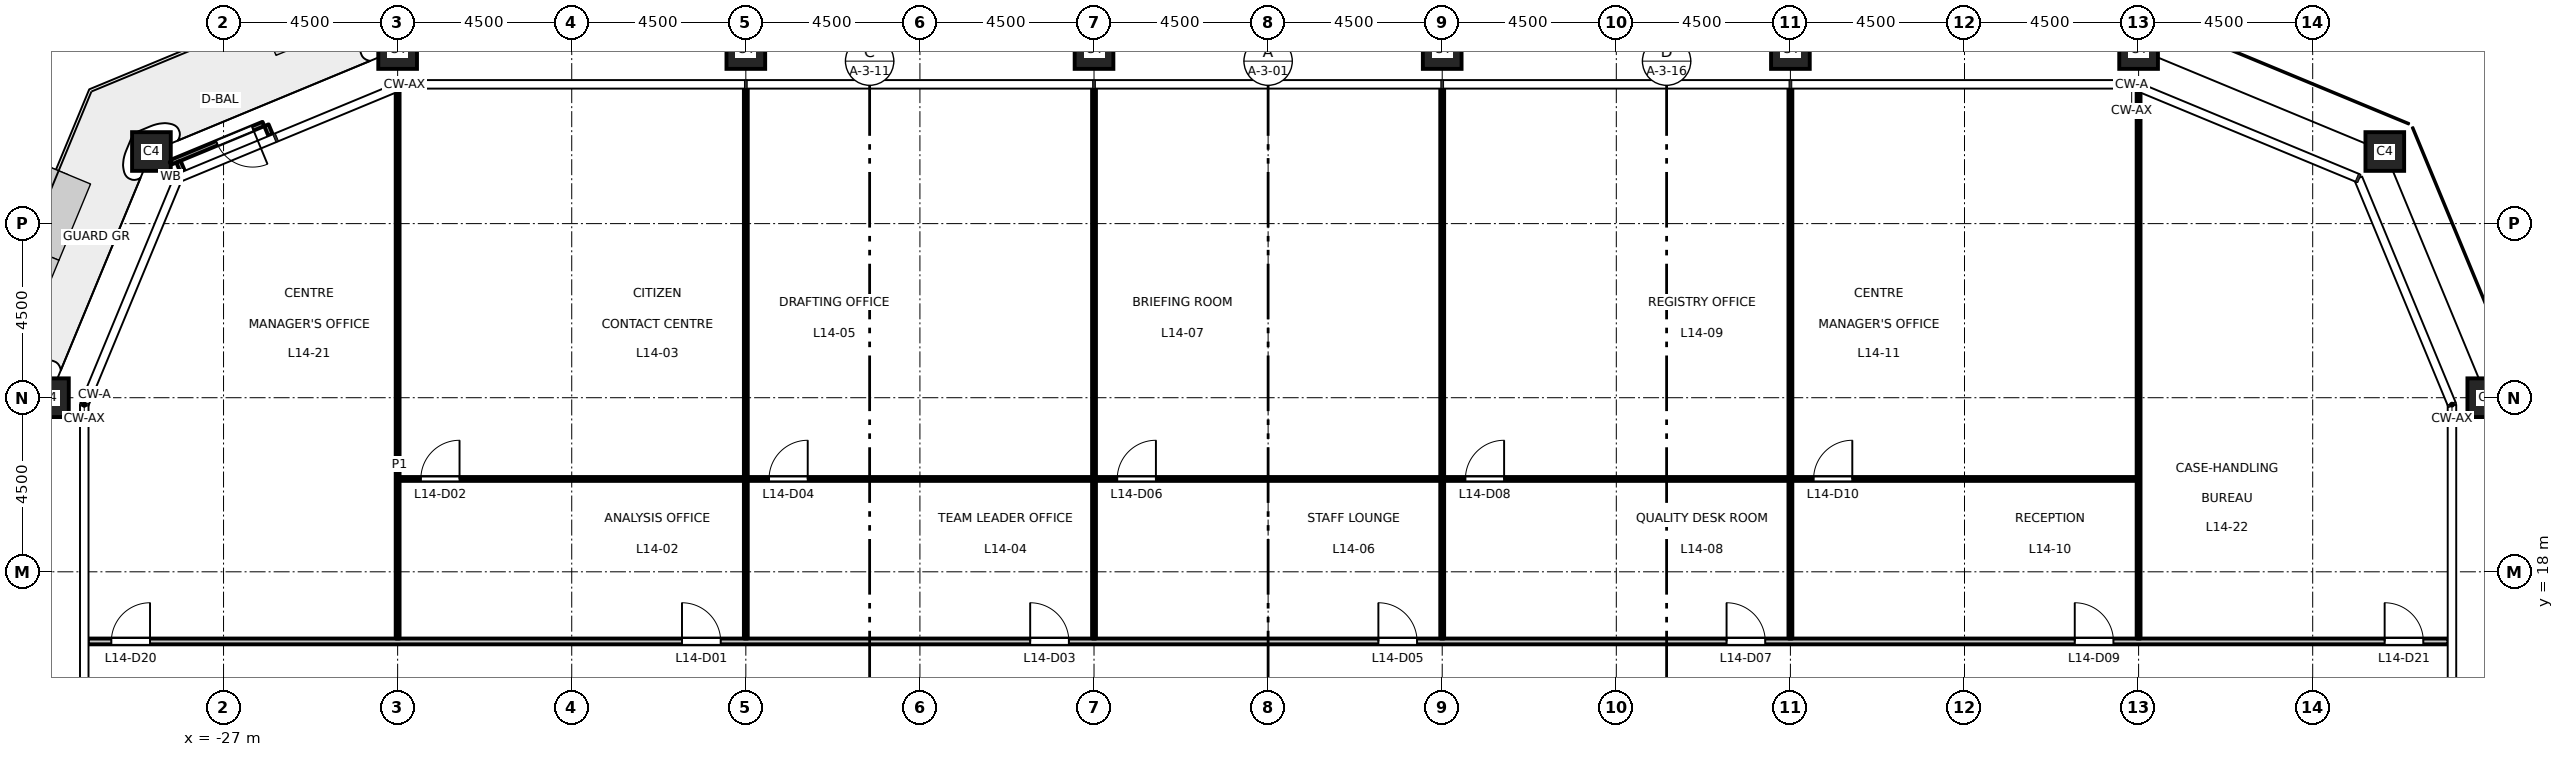
"""IFC4 building model, lengths in metres.
Left out: names, types, materials, properties, quantities, classifications, styles, units other than length and angle.
Written with IfcOpenShell. Run it as: python <this file> out.ifc"""

import sys

from ifc_helpers import new_model, si_unit, direction, frame, frame_2d, origin, origin_2d, place, context, subcontext, project, spatial, rectangle, hollow_rectangle, extrude, element, fill, save


model = new_model("IFC4")
c1 = context("Model", 3, precision=1e-05, world=origin(), true_north=direction((0.0, 1.0)))
c2 = subcontext(c1, "Body", "Model", "MODEL_VIEW")
j1 = project(units=[si_unit("LENGTHUNIT", "METRE"), si_unit("PLANEANGLEUNIT", "RADIAN")], contexts=[c1])
p1 = place(None, origin())
s1 = spatial("IfcSite", under=j1, at=p1, CompositionType="ELEMENT")
p2 = place(p1, origin())
s2 = spatial("IfcBuilding", under=s1, at=p2, CompositionType="ELEMENT")
p3 = place(p2, frame((0.0, 0.0, 67.2)))
s3 = spatial("IfcBuildingStorey", under=s2, at=p3, CompositionType="ELEMENT", Elevation=67.2)
for number, where, z_axis, x_axis in (
    (1, (31.5, 22.5, 0.0), (0.0, 0.0, 1.0), (1.0, 0.0, 0.0)),
    (2, (28.864, 28.864, 0.0), (0.0, 0.0, 1.0), (1.0, 0.0, 0.0)),
    (3, (22.5, 31.5, 0.0), (0.0, 0.0, 1.0), (1.0, 0.0, 0.0)),
    (4, (13.5, 31.5, 0.0), (0.0, 0.0, 1.0), (1.0, 0.0, 0.0)),
    (5, (4.5, 31.5, 0.0), (0.0, 0.0, 1.0), (1.0, 0.0, 0.0)),
    (6, (-4.5, 31.5, 0.0), (0.0, 0.0, 1.0), (1.0, 0.0, 0.0)),
    (7, (-13.5, 31.5, 0.0), (0.0, 0.0, 1.0), (1.0, 0.0, 0.0)),
    (8, (-22.5, 31.5, 0.0), (0.0, 0.0, 1.0), (1.0, 0.0, 0.0)),
    (9, (-28.864, 28.864, 0.0), (0.0, 0.0, 1.0), (1.0, 0.0, 0.0)),
    (10, (-31.5, 22.5, 0.0), (0.0, 0.0, 1.0), (1.0, 0.0, 0.0)),
):
    element("IfcColumn", number, at=place(p3, frame(where, z_axis=z_axis, x_axis=x_axis)), inside=s3, PredefinedType="COLUMN", context=c2, shape_type="SweptSolid", body=[
        extrude(hollow_rectangle(XDim=1.0, YDim=1.0, WallThickness=0.06, at=origin_2d()), origin(), (0.0, 0.0, 1.0), 4.5),
    ])
p4 = place(p3, frame((-25.783, 29.285, 0.0), z_axis=(0.0, 0.0, 1.0), x_axis=(-0.382942403136, 0.923772220778, 0.0)))
e11 = element("IfcWall", 11, at=p4, inside=s3, PredefinedType="STANDARD", context=c2, shape_type="SweptSolid", body=[
    extrude(rectangle(XDim=0.28, YDim=0.12, at=frame_2d((0.14, 0.0))), origin(), (0.0, 0.0, 1.0), 4.35),
])
p5 = place(p3, frame((-28.058, 28.343, 0.0), z_axis=(0.0, 0.0, 1.0), x_axis=(-0.382634050621, 0.923899985553, 0.0)))
e12 = element("IfcWall", 12, at=p5, inside=s3, PredefinedType="STANDARD", context=c2, shape_type="SweptSolid", body=[
    extrude(rectangle(XDim=0.28, YDim=0.12, at=frame_2d((0.14, 0.0))), origin(), (0.0, 0.0, 1.0), 4.35),
])
p6 = place(p3, frame((-25.969, 29.576, 0.0), z_axis=(0.0, 0.0, 1.0), x_axis=(-0.923894017707, -0.382648460137, 0.0)))
e13 = element("IfcWall", 13, at=p6, inside=s3, PredefinedType="STANDARD", context=c2, shape_type="SweptSolid", body=[
    extrude(rectangle(XDim=2.592, YDim=0.12, at=frame_2d((1.296, 0.0))), origin(), (0.0, 0.0, 1.0), 4.35),
])
p7 = place(p6, frame((0.3, 0.0, 0.0)))
e14 = element("IfcOpeningElement", 14, at=p7, cuts=e13, PredefinedType="OPENING", context=c2, shape_type="SweptSolid", body=[
    extrude(rectangle(XDim=1.0, YDim=2.4, at=frame_2d((0.5, 1.2))), frame((0.0, 0.07, 0.0), z_axis=(0.0, -1.0, 0.0), x_axis=(1.0, 0.0, 0.0)), (0.0, 0.0, 1.0), 0.14),
])
p8 = place(p3, frame((-30.51, 16.2, 0.0), z_axis=(0.0, 0.0, 1.0), x_axis=(1.0, 0.0, 0.0)))
e15 = element("IfcWall", 15, at=p8, inside=s3, PredefinedType="PARTITIONING", context=c2, shape_type="SweptSolid", body=[
    extrude(rectangle(XDim=61.02, YDim=0.15, at=frame_2d((30.51, 0.0))), origin(), (0.0, 0.0, 1.0), 4.35),
])
p9 = place(p8, frame((15.36, 0.0, 0.0)))
e16 = element("IfcOpeningElement", 16, at=p9, cuts=e15, PredefinedType="OPENING", context=c2, shape_type="SweptSolid", body=[
    extrude(rectangle(XDim=1.0, YDim=2.1, at=frame_2d((0.5, 1.05))), frame((0.0, 0.085, 0.0), z_axis=(0.0, -1.0, 0.0), x_axis=(1.0, 0.0, 0.0)), (0.0, 0.0, 1.0), 0.17),
])
p10 = place(p8, frame((24.36, 0.0, 0.0)))
e17 = element("IfcOpeningElement", 17, at=p10, cuts=e15, PredefinedType="OPENING", context=c2, shape_type="SweptSolid", body=[
    extrude(rectangle(XDim=1.0, YDim=2.1, at=frame_2d((0.5, 1.05))), frame((0.0, 0.085, 0.0), z_axis=(0.0, -1.0, 0.0), x_axis=(1.0, 0.0, 0.0)), (0.0, 0.0, 1.0), 0.17),
])
p11 = place(p8, frame((33.36, 0.0, 0.0)))
e18 = element("IfcOpeningElement", 18, at=p11, cuts=e15, PredefinedType="OPENING", context=c2, shape_type="SweptSolid", body=[
    extrude(rectangle(XDim=1.0, YDim=2.1, at=frame_2d((0.5, 1.05))), frame((0.0, 0.085, 0.0), z_axis=(0.0, -1.0, 0.0), x_axis=(1.0, 0.0, 0.0)), (0.0, 0.0, 1.0), 0.17),
])
p12 = place(p8, frame((42.36, 0.0, 0.0)))
e19 = element("IfcOpeningElement", 19, at=p12, cuts=e15, PredefinedType="OPENING", context=c2, shape_type="SweptSolid", body=[
    extrude(rectangle(XDim=1.0, YDim=2.1, at=frame_2d((0.5, 1.05))), frame((0.0, 0.085, 0.0), z_axis=(0.0, -1.0, 0.0), x_axis=(1.0, 0.0, 0.0)), (0.0, 0.0, 1.0), 0.17),
])
p13 = place(p8, frame((51.36, 0.0, 0.0)))
e20 = element("IfcOpeningElement", 20, at=p13, cuts=e15, PredefinedType="OPENING", context=c2, shape_type="SweptSolid", body=[
    extrude(rectangle(XDim=1.0, YDim=2.1, at=frame_2d((0.5, 1.05))), frame((0.0, 0.085, 0.0), z_axis=(0.0, -1.0, 0.0), x_axis=(1.0, 0.0, 0.0)), (0.0, 0.0, 1.0), 0.17),
])
p14 = place(p8, frame((0.61, 0.0, 0.0)))
e21 = element("IfcOpeningElement", 21, at=p14, cuts=e15, PredefinedType="OPENING", context=c2, shape_type="SweptSolid", body=[
    extrude(rectangle(XDim=1.0, YDim=2.1, at=frame_2d((0.5, 1.05))), frame((0.0, 0.085, 0.0), z_axis=(0.0, -1.0, 0.0), x_axis=(1.0, 0.0, 0.0)), (0.0, 0.0, 1.0), 0.17),
])
p15 = place(p8, frame((59.37, 0.0, 0.0)))
e22 = element("IfcOpeningElement", 22, at=p15, cuts=e15, PredefinedType="OPENING", context=c2, shape_type="SweptSolid", body=[
    extrude(rectangle(XDim=1.0, YDim=2.1, at=frame_2d((0.5, 1.05))), frame((0.0, 0.085, 0.0), z_axis=(0.0, -1.0, 0.0), x_axis=(1.0, 0.0, 0.0)), (0.0, 0.0, 1.0), 0.17),
])
p16 = place(p3, frame((-22.45, 20.4, 0.0), z_axis=(0.0, 0.0, 1.0), x_axis=(1.0, 0.0, 0.0)))
e23 = element("IfcWall", 23, at=p16, inside=s3, PredefinedType="PARTITIONING", context=c2, shape_type="SweptSolid", body=[
    extrude(rectangle(XDim=44.9, YDim=0.1, at=frame_2d((22.45, 0.0))), origin(), (0.0, 0.0, 1.0), 4.35),
])
p17 = place(p16, frame((0.55, 0.0, 0.0)))
e24 = element("IfcOpeningElement", 24, at=p17, cuts=e23, PredefinedType="OPENING", context=c2, shape_type="SweptSolid", body=[
    extrude(rectangle(XDim=1.0, YDim=2.1, at=frame_2d((0.5, 1.05))), frame((0.0, 0.06, 0.0), z_axis=(0.0, -1.0, 0.0), x_axis=(1.0, 0.0, 0.0)), (0.0, 0.0, 1.0), 0.12),
])
p18 = place(p16, frame((9.55, 0.0, 0.0)))
e25 = element("IfcOpeningElement", 25, at=p18, cuts=e23, PredefinedType="OPENING", context=c2, shape_type="SweptSolid", body=[
    extrude(rectangle(XDim=1.0, YDim=2.1, at=frame_2d((0.5, 1.05))), frame((0.0, 0.06, 0.0), z_axis=(0.0, -1.0, 0.0), x_axis=(1.0, 0.0, 0.0)), (0.0, 0.0, 1.0), 0.12),
])
p19 = place(p16, frame((18.55, 0.0, 0.0)))
e26 = element("IfcOpeningElement", 26, at=p19, cuts=e23, PredefinedType="OPENING", context=c2, shape_type="SweptSolid", body=[
    extrude(rectangle(XDim=1.0, YDim=2.1, at=frame_2d((0.5, 1.05))), frame((0.0, 0.06, 0.0), z_axis=(0.0, -1.0, 0.0), x_axis=(1.0, 0.0, 0.0)), (0.0, 0.0, 1.0), 0.12),
])
p20 = place(p16, frame((27.55, 0.0, 0.0)))
e27 = element("IfcOpeningElement", 27, at=p20, cuts=e23, PredefinedType="OPENING", context=c2, shape_type="SweptSolid", body=[
    extrude(rectangle(XDim=1.0, YDim=2.1, at=frame_2d((0.5, 1.05))), frame((0.0, 0.06, 0.0), z_axis=(0.0, -1.0, 0.0), x_axis=(1.0, 0.0, 0.0)), (0.0, 0.0, 1.0), 0.12),
])
p21 = place(p16, frame((36.55, 0.0, 0.0)))
e28 = element("IfcOpeningElement", 28, at=p21, cuts=e23, PredefinedType="OPENING", context=c2, shape_type="SweptSolid", body=[
    extrude(rectangle(XDim=1.0, YDim=2.1, at=frame_2d((0.5, 1.05))), frame((0.0, 0.06, 0.0), z_axis=(0.0, -1.0, 0.0), x_axis=(1.0, 0.0, 0.0)), (0.0, 0.0, 1.0), 0.12),
])
p22 = place(p3, frame((-22.5, 16.275, 0.0), z_axis=(0.0, 0.0, 1.0), x_axis=(0.0, 1.0, 0.0)))
e29 = element("IfcWall", 29, at=p22, inside=s3, PredefinedType="PARTITIONING", context=c2, shape_type="SweptSolid", body=[
    extrude(rectangle(XDim=14.153, YDim=0.1, at=frame_2d((7.077, 0.0))), origin(), (0.0, 0.0, 1.0), 3.35),
])
p23 = place(p3, frame((-13.5, 16.275, 0.0), z_axis=(0.0, 0.0, 1.0), x_axis=(0.0, 1.0, 0.0)))
e30 = element("IfcWall", 30, at=p23, inside=s3, PredefinedType="PARTITIONING", context=c2, shape_type="SweptSolid", body=[
    extrude(rectangle(XDim=4.075, YDim=0.1, at=frame_2d((2.038, 0.0))), origin(), (0.0, 0.0, 1.0), 3.35),
])
p24 = place(p3, frame((-13.5, 20.45, 0.0), z_axis=(0.0, 0.0, 1.0), x_axis=(0.0, 1.0, 0.0)))
e31 = element("IfcWall", 31, at=p24, inside=s3, PredefinedType="PARTITIONING", context=c2, shape_type="SweptSolid", body=[
    extrude(rectangle(XDim=10.06, YDim=0.1, at=frame_2d((5.03, 0.0))), origin(), (0.0, 0.0, 1.0), 3.35),
])
p25 = place(p3, frame((-4.5, 16.275, 0.0), z_axis=(0.0, 0.0, 1.0), x_axis=(0.0, 1.0, 0.0)))
e32 = element("IfcWall", 32, at=p25, inside=s3, PredefinedType="PARTITIONING", context=c2, shape_type="SweptSolid", body=[
    extrude(rectangle(XDim=4.075, YDim=0.1, at=frame_2d((2.038, 0.0))), origin(), (0.0, 0.0, 1.0), 3.35),
])
p26 = place(p3, frame((-4.5, 20.45, 0.0), z_axis=(0.0, 0.0, 1.0), x_axis=(0.0, 1.0, 0.0)))
e33 = element("IfcWall", 33, at=p26, inside=s3, PredefinedType="PARTITIONING", context=c2, shape_type="SweptSolid", body=[
    extrude(rectangle(XDim=10.06, YDim=0.1, at=frame_2d((5.03, 0.0))), origin(), (0.0, 0.0, 1.0), 3.35),
])
p27 = place(p3, frame((4.5, 16.275, 0.0), z_axis=(0.0, 0.0, 1.0), x_axis=(0.0, 1.0, 0.0)))
e34 = element("IfcWall", 34, at=p27, inside=s3, PredefinedType="PARTITIONING", context=c2, shape_type="SweptSolid", body=[
    extrude(rectangle(XDim=4.075, YDim=0.1, at=frame_2d((2.038, 0.0))), origin(), (0.0, 0.0, 1.0), 3.35),
])
p28 = place(p3, frame((4.5, 20.45, 0.0), z_axis=(0.0, 0.0, 1.0), x_axis=(0.0, 1.0, 0.0)))
e35 = element("IfcWall", 35, at=p28, inside=s3, PredefinedType="PARTITIONING", context=c2, shape_type="SweptSolid", body=[
    extrude(rectangle(XDim=10.06, YDim=0.1, at=frame_2d((5.03, 0.0))), origin(), (0.0, 0.0, 1.0), 3.35),
])
p29 = place(p3, frame((13.5, 16.275, 0.0), z_axis=(0.0, 0.0, 1.0), x_axis=(0.0, 1.0, 0.0)))
e36 = element("IfcWall", 36, at=p29, inside=s3, PredefinedType="PARTITIONING", context=c2, shape_type="SweptSolid", body=[
    extrude(rectangle(XDim=4.075, YDim=0.1, at=frame_2d((2.038, 0.0))), origin(), (0.0, 0.0, 1.0), 3.35),
])
p30 = place(p3, frame((13.5, 20.45, 0.0), z_axis=(0.0, 0.0, 1.0), x_axis=(0.0, 1.0, 0.0)))
e37 = element("IfcWall", 37, at=p30, inside=s3, PredefinedType="PARTITIONING", context=c2, shape_type="SweptSolid", body=[
    extrude(rectangle(XDim=10.06, YDim=0.1, at=frame_2d((5.03, 0.0))), origin(), (0.0, 0.0, 1.0), 3.35),
])
p31 = place(p3, frame((22.5, 16.275, 0.0), z_axis=(0.0, 0.0, 1.0), x_axis=(0.0, 1.0, 0.0)))
e38 = element("IfcWall", 38, at=p31, inside=s3, PredefinedType="PARTITIONING", context=c2, shape_type="SweptSolid", body=[
    extrude(rectangle(XDim=14.153, YDim=0.1, at=frame_2d((7.077, 0.0))), origin(), (0.0, 0.0, 1.0), 3.35),
])
p32 = place(p7, origin())
e39 = element("IfcDoor", 39, at=p32, inside=s3, OperationType="SINGLE_SWING_LEFT", PredefinedType="DOOR", context=c2, shape_type="SweptSolid", body=[
    extrude(rectangle(XDim=1.0, YDim=2.4, at=frame_2d((0.5, 1.2))), frame((0.0, 0.025, 0.0), z_axis=(0.0, -1.0, 0.0), x_axis=(1.0, 0.0, 0.0)), (0.0, 0.0, 1.0), 0.05),
])
fill(e14, e39)
p33 = place(p9, origin())
e40 = element("IfcDoor", 40, at=p33, inside=s3, OperationType="SINGLE_SWING_LEFT", PredefinedType="DOOR", context=c2, shape_type="SweptSolid", body=[
    extrude(rectangle(XDim=1.0, YDim=2.1, at=frame_2d((0.5, 1.05))), frame((0.0, 0.025, 0.0), z_axis=(0.0, -1.0, 0.0), x_axis=(1.0, 0.0, 0.0)), (0.0, 0.0, 1.0), 0.05),
])
fill(e16, e40)
p34 = place(p17, origin())
e41 = element("IfcDoor", 41, at=p34, inside=s3, OperationType="SINGLE_SWING_RIGHT", PredefinedType="DOOR", context=c2, shape_type="SweptSolid", body=[
    extrude(rectangle(XDim=1.0, YDim=2.1, at=frame_2d((0.5, 1.05))), frame((0.0, 0.025, 0.0), z_axis=(0.0, -1.0, 0.0), x_axis=(1.0, 0.0, 0.0)), (0.0, 0.0, 1.0), 0.05),
])
fill(e24, e41)
p35 = place(p10, origin())
e42 = element("IfcDoor", 42, at=p35, inside=s3, OperationType="SINGLE_SWING_LEFT", PredefinedType="DOOR", context=c2, shape_type="SweptSolid", body=[
    extrude(rectangle(XDim=1.0, YDim=2.1, at=frame_2d((0.5, 1.05))), frame((0.0, 0.025, 0.0), z_axis=(0.0, -1.0, 0.0), x_axis=(1.0, 0.0, 0.0)), (0.0, 0.0, 1.0), 0.05),
])
fill(e17, e42)
p36 = place(p18, origin())
e43 = element("IfcDoor", 43, at=p36, inside=s3, OperationType="SINGLE_SWING_RIGHT", PredefinedType="DOOR", context=c2, shape_type="SweptSolid", body=[
    extrude(rectangle(XDim=1.0, YDim=2.1, at=frame_2d((0.5, 1.05))), frame((0.0, 0.025, 0.0), z_axis=(0.0, -1.0, 0.0), x_axis=(1.0, 0.0, 0.0)), (0.0, 0.0, 1.0), 0.05),
])
fill(e25, e43)
p37 = place(p11, origin())
e44 = element("IfcDoor", 44, at=p37, inside=s3, OperationType="SINGLE_SWING_LEFT", PredefinedType="DOOR", context=c2, shape_type="SweptSolid", body=[
    extrude(rectangle(XDim=1.0, YDim=2.1, at=frame_2d((0.5, 1.05))), frame((0.0, 0.025, 0.0), z_axis=(0.0, -1.0, 0.0), x_axis=(1.0, 0.0, 0.0)), (0.0, 0.0, 1.0), 0.05),
])
fill(e18, e44)
p38 = place(p19, origin())
e45 = element("IfcDoor", 45, at=p38, inside=s3, OperationType="SINGLE_SWING_RIGHT", PredefinedType="DOOR", context=c2, shape_type="SweptSolid", body=[
    extrude(rectangle(XDim=1.0, YDim=2.1, at=frame_2d((0.5, 1.05))), frame((0.0, 0.025, 0.0), z_axis=(0.0, -1.0, 0.0), x_axis=(1.0, 0.0, 0.0)), (0.0, 0.0, 1.0), 0.05),
])
fill(e26, e45)
p39 = place(p12, origin())
e46 = element("IfcDoor", 46, at=p39, inside=s3, OperationType="SINGLE_SWING_LEFT", PredefinedType="DOOR", context=c2, shape_type="SweptSolid", body=[
    extrude(rectangle(XDim=1.0, YDim=2.1, at=frame_2d((0.5, 1.05))), frame((0.0, 0.025, 0.0), z_axis=(0.0, -1.0, 0.0), x_axis=(1.0, 0.0, 0.0)), (0.0, 0.0, 1.0), 0.05),
])
fill(e19, e46)
p40 = place(p20, origin())
e47 = element("IfcDoor", 47, at=p40, inside=s3, OperationType="SINGLE_SWING_RIGHT", PredefinedType="DOOR", context=c2, shape_type="SweptSolid", body=[
    extrude(rectangle(XDim=1.0, YDim=2.1, at=frame_2d((0.5, 1.05))), frame((0.0, 0.025, 0.0), z_axis=(0.0, -1.0, 0.0), x_axis=(1.0, 0.0, 0.0)), (0.0, 0.0, 1.0), 0.05),
])
fill(e27, e47)
p41 = place(p13, origin())
e48 = element("IfcDoor", 48, at=p41, inside=s3, OperationType="SINGLE_SWING_LEFT", PredefinedType="DOOR", context=c2, shape_type="SweptSolid", body=[
    extrude(rectangle(XDim=1.0, YDim=2.1, at=frame_2d((0.5, 1.05))), frame((0.0, 0.025, 0.0), z_axis=(0.0, -1.0, 0.0), x_axis=(1.0, 0.0, 0.0)), (0.0, 0.0, 1.0), 0.05),
])
fill(e20, e48)
p42 = place(p21, origin())
e49 = element("IfcDoor", 49, at=p42, inside=s3, OperationType="SINGLE_SWING_RIGHT", PredefinedType="DOOR", context=c2, shape_type="SweptSolid", body=[
    extrude(rectangle(XDim=1.0, YDim=2.1, at=frame_2d((0.5, 1.05))), frame((0.0, 0.025, 0.0), z_axis=(0.0, -1.0, 0.0), x_axis=(1.0, 0.0, 0.0)), (0.0, 0.0, 1.0), 0.05),
])
fill(e28, e49)
p43 = place(p14, origin())
e50 = element("IfcDoor", 50, at=p43, inside=s3, OperationType="SINGLE_SWING_RIGHT", PredefinedType="DOOR", context=c2, shape_type="SweptSolid", body=[
    extrude(rectangle(XDim=1.0, YDim=2.1, at=frame_2d((0.5, 1.05))), frame((0.0, 0.025, 0.0), z_axis=(0.0, -1.0, 0.0), x_axis=(1.0, 0.0, 0.0)), (0.0, 0.0, 1.0), 0.05),
])
fill(e21, e50)
p44 = place(p15, origin())
e51 = element("IfcDoor", 51, at=p44, inside=s3, OperationType="SINGLE_SWING_LEFT", PredefinedType="DOOR", context=c2, shape_type="SweptSolid", body=[
    extrude(rectangle(XDim=1.0, YDim=2.1, at=frame_2d((0.5, 1.05))), frame((0.0, 0.025, 0.0), z_axis=(0.0, -1.0, 0.0), x_axis=(1.0, 0.0, 0.0)), (0.0, 0.0, 1.0), 0.05),
])
fill(e22, e51)
save(model, sys.argv[1])
